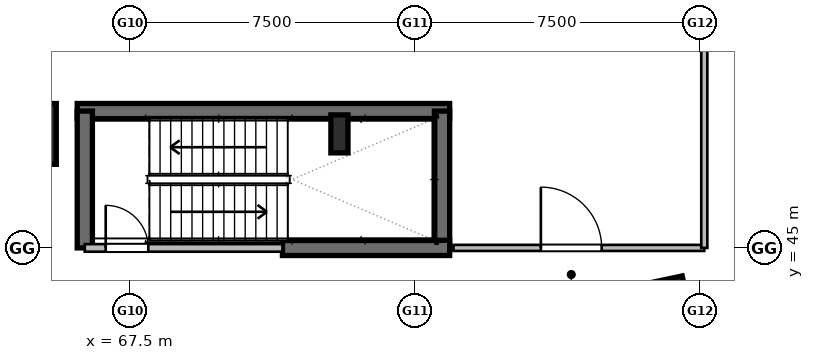
"""IFC4 building model, lengths in metres.
Left out: names, types, materials, properties, quantities, classifications, styles, units other than length and angle.
Written with IfcOpenShell. Run it as: python <this file> out.ifc"""

import sys

from ifc_helpers import new_model, si_unit, direction, frame, frame_2d, origin, origin_2d, place, context, subcontext, project, spatial, rectangle, hollow_rectangle, i_section, extrude, element, fill, save


model = new_model("IFC4")
c1 = context("Model", 3, precision=1e-05, world=origin(), true_north=direction((0.0, 1.0)))
c2 = subcontext(c1, "Body", "Model", "MODEL_VIEW")
j1 = project(units=[si_unit("LENGTHUNIT", "METRE"), si_unit("PLANEANGLEUNIT", "RADIAN")], contexts=[c1])
p1 = place(None, origin())
s1 = spatial("IfcSite", under=j1, at=p1, CompositionType="ELEMENT")
p2 = place(p1, origin())
s2 = spatial("IfcBuilding", under=s1, at=p2, CompositionType="ELEMENT")
p3 = place(p2, frame((0.0, 0.0, 15.6)))
s3 = spatial("IfcBuildingStorey", under=s2, at=p3, CompositionType="ELEMENT", Elevation=15.6)
for number, where, z_axis, x_axis in (
    (1, (64.75, 48.0, 0.0), (0.0, 0.0, 1.0), (1.0, 0.0, 0.0)),
    (2, (81.403, 43.313, 0.0), (0.0, 0.0, 1.0), (0.978, 0.208, 0.0)),
):
    element("IfcColumn", number, at=place(p3, frame(where, z_axis=z_axis, x_axis=x_axis)), inside=s3, PredefinedType="COLUMN", context=c2, shape_type="SweptSolid", body=[
        extrude(hollow_rectangle(XDim=1.6, YDim=1.6, WallThickness=0.04, at=origin_2d()), origin(), (0.0, 0.0, 1.0), 4.8),
    ])
p4 = place(p3, frame((73.0, 48.0, 0.0), z_axis=(0.0, 0.0, 1.0), x_axis=(1.0, 0.0, 0.0)))
e3 = element("IfcColumn", 3, at=p4, inside=s3, PredefinedType="COLUMN", context=c2, shape_type="SweptSolid", body=[
    extrude(i_section(OverallWidth=0.45, OverallDepth=1.0, WebThickness=0.022, FlangeThickness=0.04, at=origin_2d()), origin(), (0.0, 0.0, 1.0), 4.8),
])
p5 = place(p3, frame((66.1, 48.6, 0.0), z_axis=(0.0, 0.0, 1.0), x_axis=(1.0, 0.0, 0.0)))
e4 = element("IfcWall", 4, at=p5, inside=s3, PredefinedType="SHEAR", context=c2, shape_type="SweptSolid", body=[
    extrude(rectangle(XDim=9.8, YDim=0.4, at=frame_2d((4.9, 0.0))), origin(), (0.0, 0.0, 1.0), 4.8),
])
for number, where, z_axis, x_axis in (
    (5, (66.3, 45.0, 0.0), (0.0, 0.0, 1.0), (0.0, 1.0, 0.0)),
    (6, (75.7, 45.0, 0.0), (0.0, 0.0, 1.0), (0.0, 1.0, 0.0)),
):
    element("IfcWall", number, at=place(p3, frame(where, z_axis=z_axis, x_axis=x_axis)), inside=s3, PredefinedType="SHEAR", context=c2, shape_type="SweptSolid", body=[
        extrude(rectangle(XDim=3.6, YDim=0.4, at=frame_2d((1.8, 0.0))), origin(), (0.0, 0.0, 1.0), 4.8),
    ])
p6 = place(p3, frame((71.5, 45.0, 0.0), z_axis=(0.0, 0.0, 1.0), x_axis=(1.0, 0.0, 0.0)))
e7 = element("IfcWall", 7, at=p6, inside=s3, PredefinedType="SHEAR", context=c2, shape_type="SweptSolid", body=[
    extrude(rectangle(XDim=4.4, YDim=0.4, at=frame_2d((2.2, 0.0))), origin(), (0.0, 0.0, 1.0), 4.8),
])
p7 = place(p3, frame((66.3, 45.0, 0.0), z_axis=(0.0, 0.0, 1.0), x_axis=(1.0, 0.0, 0.0)))
e8 = element("IfcWall", 8, at=p7, inside=s3, PredefinedType="PARTITIONING", context=c2, shape_type="SweptSolid", body=[
    extrude(rectangle(XDim=5.2, YDim=0.2, at=frame_2d((2.6, 0.0))), origin(), (0.0, 0.0, 1.0), 4.48),
])
p8 = place(p7, frame((0.55, 0.0, 0.0)))
e9 = element("IfcOpeningElement", 9, at=p8, cuts=e8, PredefinedType="OPENING", context=c2, shape_type="SweptSolid", body=[
    extrude(rectangle(XDim=1.12, YDim=2.1, at=frame_2d((0.56, 1.05))), frame((0.0, 0.11, 0.0), z_axis=(0.0, -1.0, 0.0), x_axis=(1.0, 0.0, 0.0)), (0.0, 0.0, 1.0), 0.22),
])
p9 = place(p3, frame((76.0, 45.0, 0.0), z_axis=(0.0, 0.0, 1.0), x_axis=(1.0, 0.0, 0.0)))
e10 = element("IfcWall", 10, at=p9, inside=s3, PredefinedType="PARTITIONING", context=c2, shape_type="SweptSolid", body=[
    extrude(rectangle(XDim=6.6, YDim=0.16, at=frame_2d((3.3, 0.0))), origin(), (0.0, 0.0, 1.0), 4.48),
])
p10 = place(p9, frame((2.3, 0.0, 0.0)))
e11 = element("IfcOpeningElement", 11, at=p10, cuts=e10, PredefinedType="OPENING", context=c2, shape_type="SweptSolid", body=[
    extrude(rectangle(XDim=1.6, YDim=2.2, at=frame_2d((0.8, 1.1))), frame((0.0, 0.09, 0.0), z_axis=(0.0, -1.0, 0.0), x_axis=(1.0, 0.0, 0.0)), (0.0, 0.0, 1.0), 0.18),
])
p11 = place(p3, frame((82.6, 45.0, 0.0), z_axis=(0.0, 0.0, 1.0), x_axis=(0.0, 1.0, 0.0)))
e12 = element("IfcWall", 12, at=p11, inside=s3, PredefinedType="PARTITIONING", context=c2, shape_type="SweptSolid", body=[
    extrude(rectangle(XDim=5.35, YDim=0.16, at=frame_2d((2.675, 0.0))), origin(), (0.0, 0.0, 1.0), 4.48),
])
p12 = place(p8, origin())
e13 = element("IfcDoor", 13, at=p12, inside=s3, OperationType="SINGLE_SWING_LEFT", PredefinedType="DOOR", context=c2, shape_type="SweptSolid", body=[
    extrude(rectangle(XDim=1.12, YDim=2.1, at=frame_2d((0.56, 1.05))), frame((0.0, 0.025, 0.0), z_axis=(0.0, -1.0, 0.0), x_axis=(1.0, 0.0, 0.0)), (0.0, 0.0, 1.0), 0.05),
])
fill(e9, e13)
p13 = place(p10, origin())
e14 = element("IfcDoor", 14, at=p13, inside=s3, OperationType="DOUBLE_DOOR_SINGLE_SWING", PredefinedType="DOOR", context=c2, shape_type="SweptSolid", body=[
    extrude(rectangle(XDim=1.6, YDim=2.2, at=frame_2d((0.8, 1.1))), frame((0.0, 0.025, 0.0), z_axis=(0.0, -1.0, 0.0), x_axis=(1.0, 0.0, 0.0)), (0.0, 0.0, 1.0), 0.05),
])
fill(e11, e14)
save(model, sys.argv[1])
